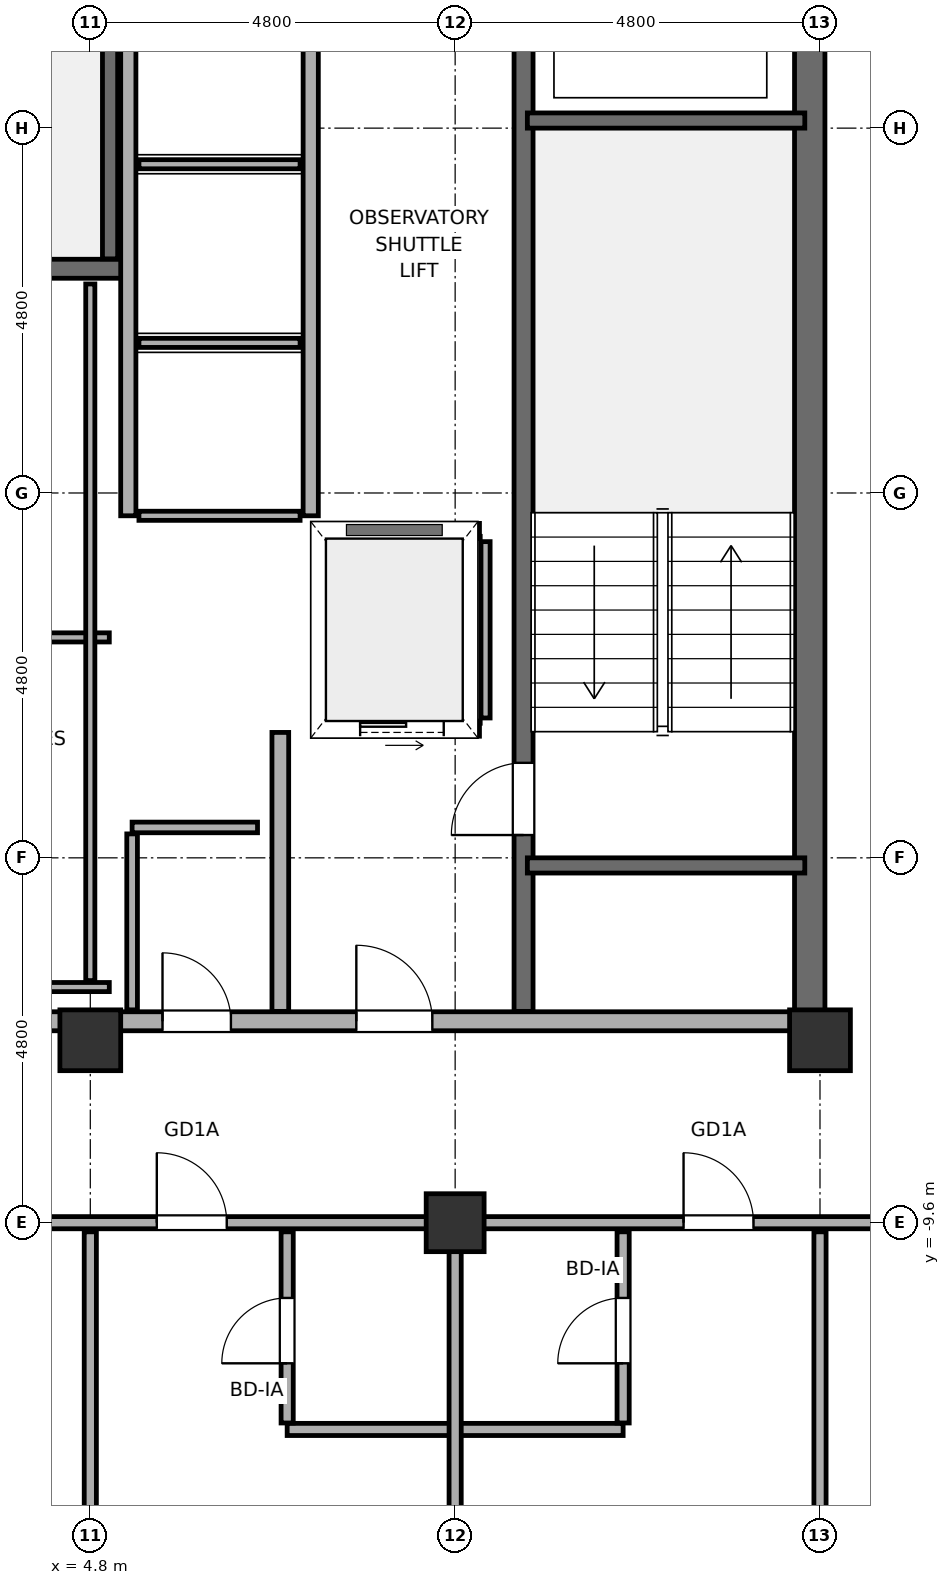
"""IFC4 building model, lengths in metres.
Left out: names, types, materials, properties, quantities, classifications, styles, units other than length and angle.
Written with IfcOpenShell. Run it as: python <this file> out.ifc"""

import sys

from ifc_helpers import new_model, si_unit, direction, frame, frame_2d, origin, origin_2d, place, context, subcontext, project, spatial, rectangle, hollow_rectangle, hollow_circle, extrude, element, fill, save


model = new_model("IFC4")
c1 = context("Model", 3, precision=1e-05, world=origin(), true_north=direction((0.0, 1.0)))
c2 = subcontext(c1, "Body", "Model", "MODEL_VIEW")
j1 = project(units=[si_unit("LENGTHUNIT", "METRE"), si_unit("PLANEANGLEUNIT", "RADIAN")], contexts=[c1])
p1 = place(None, origin())
s1 = spatial("IfcSite", under=j1, at=p1, CompositionType="ELEMENT")
p2 = place(p1, origin())
s2 = spatial("IfcBuilding", under=s1, at=p2, CompositionType="ELEMENT")
p3 = place(p2, frame((0.0, 0.0, 30.0)))
s3 = spatial("IfcBuildingStorey", under=s2, at=p3, CompositionType="ELEMENT", Elevation=30.0)
p4 = place(p3, frame((4.8, -7.2, 0.0), z_axis=(0.0, 0.0, 1.0), x_axis=(1.0, 0.0, 0.0)))
e1 = element("IfcColumn", 1, at=p4, inside=s3, PredefinedType="COLUMN", context=c2, shape_type="SweptSolid", body=[
    extrude(hollow_rectangle(XDim=0.8, YDim=0.8, WallThickness=0.036, at=origin_2d()), origin(), (0.0, 0.0, 1.0), 3.7),
])
p5 = place(p3, frame((9.6, -9.6, 0.0), z_axis=(0.0, 0.0, 1.0), x_axis=(1.0, 0.0, 0.0)))
e2 = element("IfcColumn", 2, at=p5, inside=s3, PredefinedType="COLUMN", context=c2, shape_type="SweptSolid", body=[
    extrude(hollow_circle(Radius=0.381, WallThickness=0.032, at=origin_2d()), origin(), (0.0, 0.0, 1.0), 3.7),
])
p6 = place(p3, frame((14.4, -7.2, 0.0), z_axis=(0.0, 0.0, 1.0), x_axis=(1.0, 0.0, 0.0)))
e3 = element("IfcColumn", 3, at=p6, inside=s3, PredefinedType="COLUMN", context=c2, shape_type="SweptSolid", body=[
    extrude(hollow_rectangle(XDim=0.8, YDim=0.8, WallThickness=0.036, at=origin_2d()), origin(), (0.0, 0.0, 1.0), 3.7),
])
p7 = place(p3, frame((14.265, -7.2, -0.18), z_axis=(0.0, 0.0, 1.0), x_axis=(0.0, 1.0, 0.0)))
e4 = element("IfcWall", 4, at=p7, inside=s3, PredefinedType="SHEAR", context=c2, shape_type="SweptSolid", body=[
    extrude(rectangle(XDim=14.4, YDim=0.4, at=frame_2d((7.2, 0.0))), origin(), (0.0, 0.0, 1.0), 3.7),
])
p8 = place(p3, frame((-4.6, -6.95, 0.0), z_axis=(0.0, 0.0, 1.0), x_axis=(1.0, 0.0, 0.0)))
e5 = element("IfcWall", 5, at=p8, inside=s3, PredefinedType="SOLIDWALL", context=c2, shape_type="SweptSolid", body=[
    extrude(rectangle(XDim=9.2, YDim=0.25, at=frame_2d((4.6, 0.0))), origin(), (0.0, 0.0, 1.0), 2.32),
])
p9 = place(p8, frame((0.8, 0.0, 0.0)))
e6 = element("IfcOpeningElement", 6, at=p9, cuts=e5, PredefinedType="OPENING", context=c2, shape_type="SweptSolid", body=[
    extrude(rectangle(XDim=1.2, YDim=2.2, at=frame_2d((0.6, 1.1))), frame((0.0, 0.14, 0.0), z_axis=(0.0, -1.0, 0.0), x_axis=(1.0, 0.0, 0.0)), (0.0, 0.0, 1.0), 0.28),
])
p10 = place(p8, frame((5.55, 0.0, 0.0)))
e7 = element("IfcOpeningElement", 7, at=p10, cuts=e5, PredefinedType="OPENING", context=c2, shape_type="SweptSolid", body=[
    extrude(rectangle(XDim=1.2, YDim=2.2, at=frame_2d((0.6, 1.1))), frame((0.0, 0.14, 0.0), z_axis=(0.0, -1.0, 0.0), x_axis=(1.0, 0.0, 0.0)), (0.0, 0.0, 1.0), 0.28),
])
p11 = place(p3, frame((4.8, -6.95, 0.0), z_axis=(0.0, 0.0, 1.0), x_axis=(1.0, 0.0, 0.0)))
e8 = element("IfcWall", 8, at=p11, inside=s3, PredefinedType="SOLIDWALL", context=c2, shape_type="SweptSolid", body=[
    extrude(rectangle(XDim=9.4, YDim=0.25, at=frame_2d((4.7, 0.0))), origin(), (0.0, 0.0, 1.0), 2.12),
])
p12 = place(p11, frame((3.5, 0.0, 0.0)))
e9 = element("IfcOpeningElement", 9, at=p12, cuts=e8, PredefinedType="OPENING", context=c2, shape_type="SweptSolid", body=[
    extrude(rectangle(XDim=1.0, YDim=2.02, at=frame_2d((0.5, 1.01))), frame((0.0, 0.14, 0.0), z_axis=(0.0, -1.0, 0.0), x_axis=(1.0, 0.0, 0.0)), (0.0, 0.0, 1.0), 0.28),
])
p13 = place(p11, frame((0.95, 0.0, 0.0)))
e10 = element("IfcOpeningElement", 10, at=p13, cuts=e8, PredefinedType="OPENING", context=c2, shape_type="SweptSolid", body=[
    extrude(rectangle(XDim=0.9, YDim=2.02, at=frame_2d((0.45, 1.01))), frame((0.0, 0.14, 0.0), z_axis=(0.0, -1.0, 0.0), x_axis=(1.0, 0.0, 0.0)), (0.0, 0.0, 1.0), 0.28),
])
p14 = place(p3, frame((7.3, -6.82, 0.0), z_axis=(0.0, 0.0, 1.0), x_axis=(0.0, 1.0, 0.0)))
e11 = element("IfcWall", 11, at=p14, inside=s3, PredefinedType="SOLIDWALL", context=c2, shape_type="SweptSolid", body=[
    extrude(rectangle(XDim=3.67, YDim=0.22, at=frame_2d((1.835, 0.0))), origin(), (0.0, 0.0, 1.0), 2.12),
])
p15 = place(p3, frame((10.5, -6.82, -0.18), z_axis=(0.0, 0.0, 1.0), x_axis=(0.0, 1.0, 0.0)))
e12 = element("IfcWall", 12, at=p15, inside=s3, PredefinedType="SOLIDWALL", context=c2, shape_type="SweptSolid", body=[
    extrude(rectangle(XDim=13.64, YDim=0.25, at=frame_2d((6.82, 0.0))), origin(), (0.0, 0.0, 1.0), 3.7),
])
p16 = place(p15, frame((2.32, 0.0, 0.18)))
e13 = element("IfcOpeningElement", 13, at=p16, cuts=e12, PredefinedType="OPENING", context=c2, shape_type="SweptSolid", body=[
    extrude(rectangle(XDim=0.95, YDim=2.15, at=frame_2d((0.475, 1.075))), frame((0.0, 0.14, 0.0), z_axis=(0.0, -1.0, 0.0), x_axis=(1.0, 0.0, 0.0)), (0.0, 0.0, 1.0), 0.28),
])
for number, where, z_axis, x_axis in (
    (14, (10.55, -4.9, -0.18), (0.0, 0.0, 1.0), (1.0, 0.0, 0.0)),
    (15, (10.55, 4.9, -0.18), (0.0, 0.0, 1.0), (1.0, 0.0, 0.0)),
):
    element("IfcWall", number, at=place(p3, frame(where, z_axis=z_axis, x_axis=x_axis)), inside=s3, PredefinedType="SOLIDWALL", context=c2, shape_type="SweptSolid", body=[
        extrude(rectangle(XDim=3.65, YDim=0.2, at=frame_2d((1.825, 0.0))), origin(), (0.0, 0.0, 1.0), 3.7),
    ])
p17 = place(p3, frame((-4.65, 2.95, -0.18), z_axis=(0.0, 0.0, 1.0), x_axis=(1.0, 0.0, 0.0)))
e16 = element("IfcWall", 16, at=p17, inside=s3, PredefinedType="SOLIDWALL", context=c2, shape_type="SweptSolid", body=[
    extrude(rectangle(XDim=9.9, YDim=0.25, at=frame_2d((4.95, 0.0))), origin(), (0.0, 0.0, 1.0), 3.7),
])
p18 = place(p17, frame((0.65, 0.0, 0.18)))
e17 = element("IfcOpeningElement", 17, at=p18, cuts=e16, PredefinedType="OPENING", context=c2, shape_type="SweptSolid", body=[
    extrude(rectangle(XDim=0.95, YDim=2.15, at=frame_2d((0.475, 1.075))), frame((0.0, 0.14, 0.0), z_axis=(0.0, -1.0, 0.0), x_axis=(1.0, 0.0, 0.0)), (0.0, 0.0, 1.0), 0.28),
])
p19 = place(p3, frame((5.06, 3.08, -0.18), z_axis=(0.0, 0.0, 1.0), x_axis=(0.0, 1.0, 0.0)))
e18 = element("IfcWall", 18, at=p19, inside=s3, PredefinedType="SOLIDWALL", context=c2, shape_type="SweptSolid", body=[
    extrude(rectangle(XDim=3.74, YDim=0.2, at=frame_2d((1.87, 0.0))), origin(), (0.0, 0.0, 1.0), 3.7),
])
for number, where, z_axis, x_axis in (
    (19, (7.7, -0.3, 0.0), (0.0, 0.0, 1.0), (0.0, 1.0, 0.0)),
    (20, (5.3, -0.3, 0.0), (0.0, 0.0, 1.0), (0.0, 1.0, 0.0)),
):
    element("IfcWall", number, at=place(p3, frame(where, z_axis=z_axis, x_axis=x_axis)), inside=s3, PredefinedType="SOLIDWALL", context=c2, shape_type="SweptSolid", body=[
        extrude(rectangle(XDim=6.8, YDim=0.2, at=frame_2d((3.4, 0.0))), origin(), (0.0, 0.0, 1.0), 3.52),
    ])
for number, where, z_axis, x_axis in (
    (21, (5.44, -0.3, 0.0), (0.0, 0.0, 1.0), (1.0, 0.0, 0.0)),
    (22, (5.44, 1.975, 0.0), (0.0, 0.0, 1.0), (1.0, 0.0, 0.0)),
    (23, (5.44, 4.325, 0.0), (0.0, 0.0, 1.0), (1.0, 0.0, 0.0)),
):
    element("IfcWall", number, at=place(p3, frame(where, z_axis=z_axis, x_axis=x_axis)), inside=s3, PredefinedType="PARTITIONING", context=c2, shape_type="SweptSolid", body=[
        extrude(rectangle(XDim=2.12, YDim=0.12, at=frame_2d((1.06, 0.0))), origin(), (0.0, 0.0, 1.0), 3.52),
    ])
p20 = place(p3, frame((7.88, -3.1, 0.0), z_axis=(0.0, 0.0, 1.0), x_axis=(1.0, 0.0, 0.0)))
e24 = element("IfcWall", 24, at=p20, inside=s3, PredefinedType="SOLIDWALL", context=c2, shape_type="SweptSolid", body=[
    extrude(rectangle(XDim=2.04, YDim=0.2, at=frame_2d((1.02, 0.0))), origin(), (0.0, 0.0, 1.0), 3.52),
])
p21 = place(p20, frame((0.47, 0.0, 0.0)))
e25 = element("IfcOpeningElement", 25, at=p21, cuts=e24, PredefinedType="OPENING", context=c2, shape_type="SweptSolid", body=[
    extrude(rectangle(XDim=1.1, YDim=2.2, at=frame_2d((0.55, 1.1))), frame((0.0, 0.115, 0.0), z_axis=(0.0, -1.0, 0.0), x_axis=(1.0, 0.0, 0.0)), (0.0, 0.0, 1.0), 0.23),
])
p22 = place(p3, frame((7.88, -0.5, 0.0), z_axis=(0.0, 0.0, 1.0), x_axis=(1.0, 0.0, 0.0)))
e26 = element("IfcWall", 26, at=p22, inside=s3, PredefinedType="SOLIDWALL", context=c2, shape_type="SweptSolid", body=[
    extrude(rectangle(XDim=2.04, YDim=0.2, at=frame_2d((1.02, 0.0))), origin(), (0.0, 0.0, 1.0), 3.52),
])
for number, where, z_axis, x_axis in (
    (27, (7.8, -2.96, 0.0), (0.0, 0.0, 1.0), (0.0, 1.0, 0.0)),
    (28, (10.0, -2.96, 0.0), (0.0, 0.0, 1.0), (0.0, 1.0, 0.0)),
):
    element("IfcWall", number, at=place(p3, frame(where, z_axis=z_axis, x_axis=x_axis)), inside=s3, PredefinedType="PARTITIONING", context=c2, shape_type="SweptSolid", body=[
        extrude(rectangle(XDim=2.32, YDim=0.12, at=frame_2d((1.16, 0.0))), origin(), (0.0, 0.0, 1.0), 3.52),
    ])
p23 = place(p3, frame((7.39, -12.32, 0.0), z_axis=(0.0, 0.0, 1.0), x_axis=(1.0, 0.0, 0.0)))
e29 = element("IfcWall", 29, at=p23, inside=s3, PredefinedType="PARTITIONING", context=c2, shape_type="SweptSolid", body=[
    extrude(rectangle(XDim=4.42, YDim=0.16, at=frame_2d((2.21, 0.0))), origin(), (0.0, 0.0, 1.0), 3.02),
])
p24 = place(p3, frame((-33.31, -9.6, 0.0), z_axis=(0.0, 0.0, 1.0), x_axis=(1.0, 0.0, 0.0)))
e30 = element("IfcWall", 30, at=p24, inside=s3, PredefinedType="PARTITIONING", context=c2, shape_type="SweptSolid", body=[
    extrude(rectangle(XDim=61.82, YDim=0.16, at=frame_2d((30.91, 0.0))), origin(), (0.0, 0.0, 1.0), 2.12),
])
p25 = place(p24, frame((6.679, 0.0, 0.0)))
e31 = element("IfcOpeningElement", 31, at=p25, cuts=e30, PredefinedType="OPENING", context=c2, shape_type="SweptSolid", body=[
    extrude(rectangle(XDim=0.9, YDim=2.02, at=frame_2d((0.45, 1.01))), frame((0.0, 0.095, 0.0), z_axis=(0.0, -1.0, 0.0), x_axis=(1.0, 0.0, 0.0)), (0.0, 0.0, 1.0), 0.19),
])
p26 = place(p24, frame((54.24, 0.0, 0.0)))
e32 = element("IfcOpeningElement", 32, at=p26, cuts=e30, PredefinedType="OPENING", context=c2, shape_type="SweptSolid", body=[
    extrude(rectangle(XDim=0.9, YDim=2.02, at=frame_2d((0.45, 1.01))), frame((0.0, 0.095, 0.0), z_axis=(0.0, -1.0, 0.0), x_axis=(1.0, 0.0, 0.0)), (0.0, 0.0, 1.0), 0.19),
])
p27 = place(p24, frame((10.68, 0.0, 0.0)))
e33 = element("IfcOpeningElement", 33, at=p27, cuts=e30, PredefinedType="OPENING", context=c2, shape_type="SweptSolid", body=[
    extrude(rectangle(XDim=0.92, YDim=2.02, at=frame_2d((0.46, 1.01))), frame((0.0, 0.095, 0.0), z_axis=(0.0, -1.0, 0.0), x_axis=(1.0, 0.0, 0.0)), (0.0, 0.0, 1.0), 0.19),
])
p28 = place(p24, frame((17.115, 0.0, 0.0)))
e34 = element("IfcOpeningElement", 34, at=p28, cuts=e30, PredefinedType="OPENING", context=c2, shape_type="SweptSolid", body=[
    extrude(rectangle(XDim=0.92, YDim=2.02, at=frame_2d((0.46, 1.01))), frame((0.0, 0.095, 0.0), z_axis=(0.0, -1.0, 0.0), x_axis=(1.0, 0.0, 0.0)), (0.0, 0.0, 1.0), 0.19),
])
p29 = place(p24, frame((19.785, 0.0, 0.0)))
e35 = element("IfcOpeningElement", 35, at=p29, cuts=e30, PredefinedType="OPENING", context=c2, shape_type="SweptSolid", body=[
    extrude(rectangle(XDim=0.92, YDim=2.02, at=frame_2d((0.46, 1.01))), frame((0.0, 0.095, 0.0), z_axis=(0.0, -1.0, 0.0), x_axis=(1.0, 0.0, 0.0)), (0.0, 0.0, 1.0), 0.19),
])
p30 = place(p24, frame((26.715, 0.0, 0.0)))
e36 = element("IfcOpeningElement", 36, at=p30, cuts=e30, PredefinedType="OPENING", context=c2, shape_type="SweptSolid", body=[
    extrude(rectangle(XDim=0.92, YDim=2.02, at=frame_2d((0.46, 1.01))), frame((0.0, 0.095, 0.0), z_axis=(0.0, -1.0, 0.0), x_axis=(1.0, 0.0, 0.0)), (0.0, 0.0, 1.0), 0.19),
])
p31 = place(p24, frame((29.385, 0.0, 0.0)))
e37 = element("IfcOpeningElement", 37, at=p31, cuts=e30, PredefinedType="OPENING", context=c2, shape_type="SweptSolid", body=[
    extrude(rectangle(XDim=0.92, YDim=2.02, at=frame_2d((0.46, 1.01))), frame((0.0, 0.095, 0.0), z_axis=(0.0, -1.0, 0.0), x_axis=(1.0, 0.0, 0.0)), (0.0, 0.0, 1.0), 0.19),
])
p32 = place(p24, frame((36.315, 0.0, 0.0)))
e38 = element("IfcOpeningElement", 38, at=p32, cuts=e30, PredefinedType="OPENING", context=c2, shape_type="SweptSolid", body=[
    extrude(rectangle(XDim=0.92, YDim=2.02, at=frame_2d((0.46, 1.01))), frame((0.0, 0.095, 0.0), z_axis=(0.0, -1.0, 0.0), x_axis=(1.0, 0.0, 0.0)), (0.0, 0.0, 1.0), 0.19),
])
p33 = place(p24, frame((38.985, 0.0, 0.0)))
e39 = element("IfcOpeningElement", 39, at=p33, cuts=e30, PredefinedType="OPENING", context=c2, shape_type="SweptSolid", body=[
    extrude(rectangle(XDim=0.92, YDim=2.02, at=frame_2d((0.46, 1.01))), frame((0.0, 0.095, 0.0), z_axis=(0.0, -1.0, 0.0), x_axis=(1.0, 0.0, 0.0)), (0.0, 0.0, 1.0), 0.19),
])
p34 = place(p24, frame((45.915, 0.0, 0.0)))
e40 = element("IfcOpeningElement", 40, at=p34, cuts=e30, PredefinedType="OPENING", context=c2, shape_type="SweptSolid", body=[
    extrude(rectangle(XDim=0.92, YDim=2.02, at=frame_2d((0.46, 1.01))), frame((0.0, 0.095, 0.0), z_axis=(0.0, -1.0, 0.0), x_axis=(1.0, 0.0, 0.0)), (0.0, 0.0, 1.0), 0.19),
])
p35 = place(p24, frame((48.585, 0.0, 0.0)))
e41 = element("IfcOpeningElement", 41, at=p35, cuts=e30, PredefinedType="OPENING", context=c2, shape_type="SweptSolid", body=[
    extrude(rectangle(XDim=0.92, YDim=2.02, at=frame_2d((0.46, 1.01))), frame((0.0, 0.095, 0.0), z_axis=(0.0, -1.0, 0.0), x_axis=(1.0, 0.0, 0.0)), (0.0, 0.0, 1.0), 0.19),
])
p36 = place(p3, frame((2.6, -6.5, 0.0), z_axis=(0.0, 0.0, 1.0), x_axis=(1.0, 0.0, 0.0)))
e42 = element("IfcWall", 42, at=p36, inside=s3, PredefinedType="PARTITIONING", context=c2, shape_type="SweptSolid", body=[
    extrude(rectangle(XDim=2.45, YDim=0.12, at=frame_2d((1.225, 0.0))), origin(), (0.0, 0.0, 1.0), 3.52),
])
p37 = place(p3, frame((5.35, -4.4, 0.0), z_axis=(0.0, 0.0, 1.0), x_axis=(1.0, 0.0, 0.0)))
e43 = element("IfcWall", 43, at=p37, inside=s3, PredefinedType="PLUMBINGWALL", context=c2, shape_type="SweptSolid", body=[
    extrude(rectangle(XDim=1.65, YDim=0.14, at=frame_2d((0.825, 0.0))), origin(), (0.0, 0.0, 1.0), 3.52),
])
p38 = place(p3, frame((2.6, -1.9, 0.0), z_axis=(0.0, 0.0, 1.0), x_axis=(1.0, 0.0, 0.0)))
e44 = element("IfcWall", 44, at=p38, inside=s3, PredefinedType="PARTITIONING", context=c2, shape_type="SweptSolid", body=[
    extrude(rectangle(XDim=2.45, YDim=0.12, at=frame_2d((1.225, 0.0))), origin(), (0.0, 0.0, 1.0), 3.52),
])
p39 = place(p3, frame((4.8, -23.71, 0.0), z_axis=(0.0, 0.0, 1.0), x_axis=(0.0, 1.0, 0.0)))
e45 = element("IfcWall", 45, at=p39, inside=s3, PredefinedType="PARTITIONING", context=c2, shape_type="SweptSolid", body=[
    extrude(rectangle(XDim=13.99, YDim=0.16, at=frame_2d((6.995, 0.0))), origin(), (0.0, 0.0, 1.0), 2.12),
])
p40 = place(p3, frame((4.8, -6.415, 0.0), z_axis=(0.0, 0.0, 1.0), x_axis=(0.0, 1.0, 0.0)))
e46 = element("IfcWall", 46, at=p40, inside=s3, PredefinedType="PARTITIONING", context=c2, shape_type="SweptSolid", body=[
    extrude(rectangle(XDim=9.165, YDim=0.12, at=frame_2d((4.583, 0.0))), origin(), (0.0, 0.0, 1.0), 3.52),
])
p41 = place(p3, frame((5.35, -6.8, 0.0), z_axis=(0.0, 0.0, 1.0), x_axis=(0.0, 1.0, 0.0)))
e47 = element("IfcWall", 47, at=p41, inside=s3, PredefinedType="PLUMBINGWALL", context=c2, shape_type="SweptSolid", body=[
    extrude(rectangle(XDim=2.315, YDim=0.14, at=frame_2d((1.157, 0.0))), origin(), (0.0, 0.0, 1.0), 2.12),
])
p42 = place(p3, frame((7.39, -12.235, 0.0), z_axis=(0.0, 0.0, 1.0), x_axis=(0.0, 1.0, 0.0)))
e48 = element("IfcWall", 48, at=p42, inside=s3, PredefinedType="PARTITIONING", context=c2, shape_type="SweptSolid", body=[
    extrude(rectangle(XDim=2.515, YDim=0.16, at=frame_2d((1.258, 0.0))), origin(), (0.0, 0.0, 1.0), 2.12),
])
p43 = place(p42, frame((0.785, 0.0, 0.0)))
e49 = element("IfcOpeningElement", 49, at=p43, cuts=e48, PredefinedType="OPENING", context=c2, shape_type="SweptSolid", body=[
    extrude(rectangle(XDim=0.86, YDim=2.02, at=frame_2d((0.43, 1.01))), frame((0.0, 0.095, 0.0), z_axis=(0.0, -1.0, 0.0), x_axis=(1.0, 0.0, 0.0)), (0.0, 0.0, 1.0), 0.19),
])
p44 = place(p3, frame((9.6, -23.71, 0.0), z_axis=(0.0, 0.0, 1.0), x_axis=(0.0, 1.0, 0.0)))
e50 = element("IfcWall", 50, at=p44, inside=s3, PredefinedType="PARTITIONING", context=c2, shape_type="SweptSolid", body=[
    extrude(rectangle(XDim=13.99, YDim=0.16, at=frame_2d((6.995, 0.0))), origin(), (0.0, 0.0, 1.0), 2.12),
])
p45 = place(p3, frame((11.81, -12.235, 0.0), z_axis=(0.0, 0.0, 1.0), x_axis=(0.0, 1.0, 0.0)))
e51 = element("IfcWall", 51, at=p45, inside=s3, PredefinedType="PARTITIONING", context=c2, shape_type="SweptSolid", body=[
    extrude(rectangle(XDim=2.515, YDim=0.16, at=frame_2d((1.258, 0.0))), origin(), (0.0, 0.0, 1.0), 2.12),
])
p46 = place(p45, frame((0.785, 0.0, 0.0)))
e52 = element("IfcOpeningElement", 52, at=p46, cuts=e51, PredefinedType="OPENING", context=c2, shape_type="SweptSolid", body=[
    extrude(rectangle(XDim=0.86, YDim=2.02, at=frame_2d((0.43, 1.01))), frame((0.0, 0.095, 0.0), z_axis=(0.0, -1.0, 0.0), x_axis=(1.0, 0.0, 0.0)), (0.0, 0.0, 1.0), 0.19),
])
p47 = place(p3, frame((14.4, -23.71, 0.0), z_axis=(0.0, 0.0, 1.0), x_axis=(0.0, 1.0, 0.0)))
e53 = element("IfcWall", 53, at=p47, inside=s3, PredefinedType="PARTITIONING", context=c2, shape_type="SweptSolid", body=[
    extrude(rectangle(XDim=13.99, YDim=0.16, at=frame_2d((6.995, 0.0))), origin(), (0.0, 0.0, 1.0), 2.12),
])
p48 = place(p12, origin())
e54 = element("IfcDoor", 54, at=p48, inside=s3, OperationType="SINGLE_SWING_LEFT", PredefinedType="DOOR", context=c2, shape_type="SweptSolid", body=[
    extrude(rectangle(XDim=1.0, YDim=2.02, at=frame_2d((0.5, 1.01))), frame((0.0, 0.025, 0.0), z_axis=(0.0, -1.0, 0.0), x_axis=(1.0, 0.0, 0.0)), (0.0, 0.0, 1.0), 0.05),
])
fill(e9, e54)
p49 = place(p16, origin())
e55 = element("IfcDoor", 55, at=p49, inside=s3, OperationType="SINGLE_SWING_LEFT", PredefinedType="DOOR", context=c2, shape_type="SweptSolid", body=[
    extrude(rectangle(XDim=0.95, YDim=2.15, at=frame_2d((0.475, 1.075))), frame((0.0, 0.025, 0.0), z_axis=(0.0, -1.0, 0.0), x_axis=(1.0, 0.0, 0.0)), (0.0, 0.0, 1.0), 0.05),
])
fill(e13, e55)
p50 = place(p21, origin())
e56 = element("IfcDoor", 56, at=p50, inside=s3, OperationType="SLIDING_TO_LEFT", PredefinedType="DOOR", context=c2, shape_type="SweptSolid", body=[
    extrude(rectangle(XDim=1.1, YDim=2.2, at=frame_2d((0.55, 1.1))), frame((0.0, 0.025, 0.0), z_axis=(0.0, -1.0, 0.0), x_axis=(1.0, 0.0, 0.0)), (0.0, 0.0, 1.0), 0.05),
])
fill(e25, e56)
p51 = place(p13, origin())
e57 = element("IfcDoor", 57, at=p51, inside=s3, OperationType="SINGLE_SWING_LEFT", PredefinedType="DOOR", context=c2, shape_type="SweptSolid", body=[
    extrude(rectangle(XDim=0.9, YDim=2.02, at=frame_2d((0.45, 1.01))), frame((0.0, 0.025, 0.0), z_axis=(0.0, -1.0, 0.0), x_axis=(1.0, 0.0, 0.0)), (0.0, 0.0, 1.0), 0.05),
])
fill(e10, e57)
p52 = place(p33, origin())
e58 = element("IfcDoor", 58, at=p52, inside=s3, OperationType="SINGLE_SWING_RIGHT", PredefinedType="DOOR", context=c2, shape_type="SweptSolid", body=[
    extrude(rectangle(XDim=0.92, YDim=2.02, at=frame_2d((0.46, 1.01))), frame((0.0, 0.025, 0.0), z_axis=(0.0, -1.0, 0.0), x_axis=(1.0, 0.0, 0.0)), (0.0, 0.0, 1.0), 0.05),
])
fill(e39, e58)
p53 = place(p43, origin())
e59 = element("IfcDoor", 59, at=p53, inside=s3, OperationType="SINGLE_SWING_LEFT", PredefinedType="DOOR", context=c2, shape_type="SweptSolid", body=[
    extrude(rectangle(XDim=0.86, YDim=2.02, at=frame_2d((0.43, 1.01))), frame((0.0, 0.025, 0.0), z_axis=(0.0, -1.0, 0.0), x_axis=(1.0, 0.0, 0.0)), (0.0, 0.0, 1.0), 0.05),
])
fill(e49, e59)
p54 = place(p34, origin())
e60 = element("IfcDoor", 60, at=p54, inside=s3, OperationType="SINGLE_SWING_RIGHT", PredefinedType="DOOR", context=c2, shape_type="SweptSolid", body=[
    extrude(rectangle(XDim=0.92, YDim=2.02, at=frame_2d((0.46, 1.01))), frame((0.0, 0.025, 0.0), z_axis=(0.0, -1.0, 0.0), x_axis=(1.0, 0.0, 0.0)), (0.0, 0.0, 1.0), 0.05),
])
fill(e40, e60)
p55 = place(p46, origin())
e61 = element("IfcDoor", 61, at=p55, inside=s3, OperationType="SINGLE_SWING_LEFT", PredefinedType="DOOR", context=c2, shape_type="SweptSolid", body=[
    extrude(rectangle(XDim=0.86, YDim=2.02, at=frame_2d((0.43, 1.01))), frame((0.0, 0.025, 0.0), z_axis=(0.0, -1.0, 0.0), x_axis=(1.0, 0.0, 0.0)), (0.0, 0.0, 1.0), 0.05),
])
fill(e52, e61)
save(model, sys.argv[1])
